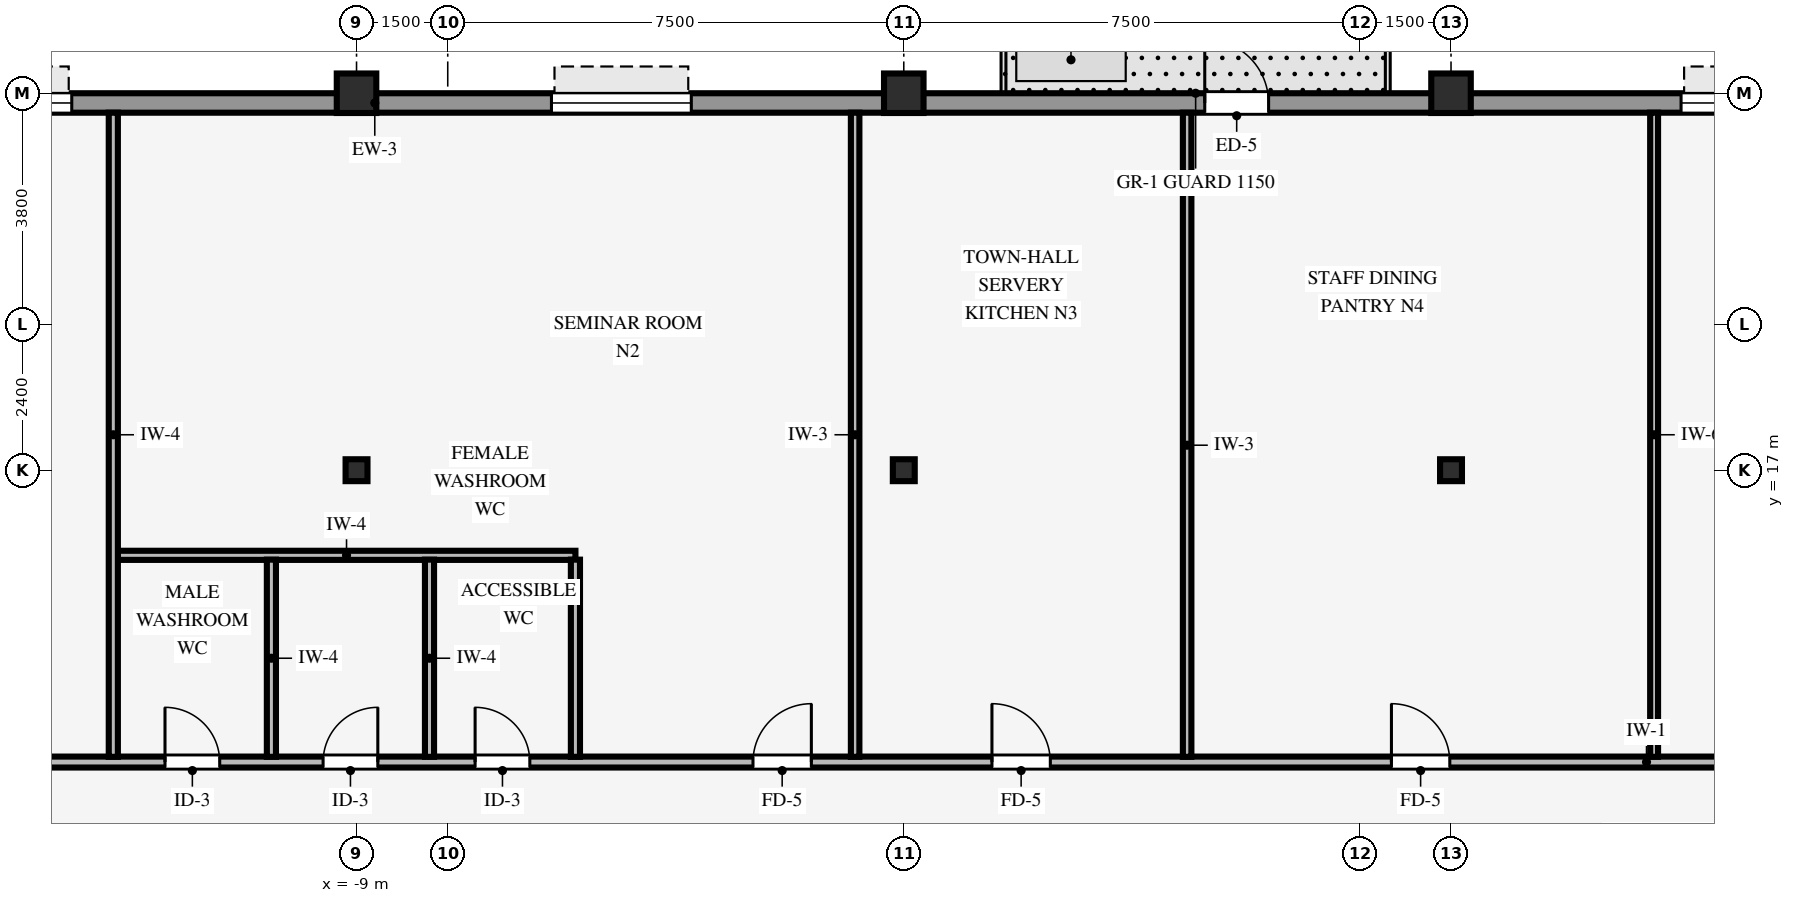
"""IFC4 building model, lengths in metres.
Left out: names, types, materials, properties, quantities, classifications, styles, units other than length and angle.
Written with IfcOpenShell. Run it as: python <this file> out.ifc"""

import sys

from ifc_helpers import new_model, si_unit, direction, frame, frame_2d, origin, origin_2d, place, context, subcontext, project, spatial, rectangle, hollow_rectangle, i_section, extrude, source, transform, mapped, element, fill, save


model = new_model("IFC4")
c1 = context("Model", 3, precision=1e-05, world=origin(), true_north=direction((0.0, 1.0)))
c2 = subcontext(c1, "Body", "Model", "MODEL_VIEW")
j1 = project(units=[si_unit("LENGTHUNIT", "METRE"), si_unit("PLANEANGLEUNIT", "RADIAN")], contexts=[c1])
p1 = place(None, origin())
s1 = spatial("IfcSite", under=j1, at=p1, CompositionType="ELEMENT")
p2 = place(p1, origin())
s2 = spatial("IfcBuilding", under=s1, at=p2, CompositionType="ELEMENT")
p3 = place(p2, frame((0.0, 0.0, 98.3)))
s3 = spatial("IfcBuildingStorey", under=s2, at=p3, CompositionType="ELEMENT", Elevation=98.3)
for number, where, z_axis, x_axis in (
    (1, (-9.0, 23.2, 0.0), (0.0, 0.0, 1.0), (1.0, 0.0, 0.0)),
    (2, (0.0, 23.2, 0.0), (0.0, 0.0, 1.0), (1.0, 0.0, 0.0)),
    (3, (9.0, 23.2, 0.0), (0.0, 0.0, 1.0), (1.0, 0.0, 0.0)),
):
    element("IfcColumn", number, at=place(p3, frame(where, z_axis=z_axis, x_axis=x_axis)), inside=s3, PredefinedType="COLUMN", context=c2, shape_type="SweptSolid", body=[
        extrude(hollow_rectangle(XDim=0.65, YDim=0.65, WallThickness=0.04, InnerFilletRadius=0.04, OuterFilletRadius=0.08, at=origin_2d()), origin(), (0.0, 0.0, 1.0), 3.37),
    ])
for number, where, z_axis, x_axis in (
    (4, (0.0, 17.0, 0.0), (0.0, 0.0, 1.0), (1.0, 0.0, 0.0)),
    (5, (-9.0, 17.0, 0.0), (0.0, 0.0, 1.0), (1.0, 0.0, 0.0)),
    (6, (9.0, 17.0, 0.0), (0.0, 0.0, 1.0), (1.0, 0.0, 0.0)),
):
    element("IfcColumn", number, at=place(p3, frame(where, z_axis=z_axis, x_axis=x_axis)), inside=s3, PredefinedType="COLUMN", context=c2, shape_type="SweptSolid", body=[
        extrude(i_section(OverallWidth=0.36, OverallDepth=0.36, WebThickness=0.021, FlangeThickness=0.021, FilletRadius=0.018, at=origin_2d()), origin(), (0.0, 0.0, 1.0), 3.37),
    ])
p4 = place(p3, frame((-21.9, 23.04, 0.0), z_axis=(0.0, 0.0, 1.0), x_axis=(1.0, 0.0, 0.0)))
e7 = element("IfcWall", 7, at=p4, inside=s3, PredefinedType="STANDARD", context=c2, shape_type="SweptSolid", body=[
    extrude(rectangle(XDim=43.8, YDim=0.32, at=frame_2d((21.9, 0.0))), origin(), (0.0, 0.0, 1.0), 2.705),
])
p5 = place(p4, frame((26.85, 0.0, 0.0)))
e8 = element("IfcOpeningElement", 8, at=p5, cuts=e7, PredefinedType="OPENING", context=c2, shape_type="SweptSolid", body=[
    extrude(rectangle(XDim=1.05, YDim=2.1, at=frame_2d((0.525, 1.05))), frame((0.0, 0.17, 0.0), z_axis=(0.0, -1.0, 0.0), x_axis=(1.0, 0.0, 0.0)), (0.0, 0.0, 1.0), 0.34),
])
p6 = place(p4, frame((2.172, 0.0, 0.8)))
e9 = element("IfcOpeningElement", 9, at=p6, cuts=e7, PredefinedType="OPENING", context=c2, shape_type="SweptSolid", body=[
    extrude(rectangle(XDim=2.3, YDim=1.62, at=frame_2d((1.15, 0.81))), frame((0.0, 0.17, 0.0), z_axis=(0.0, -1.0, 0.0), x_axis=(1.0, 0.0, 0.0)), (0.0, 0.0, 1.0), 0.34),
])
p7 = place(p4, frame((5.917, 0.0, 0.8)))
e10 = element("IfcOpeningElement", 10, at=p7, cuts=e7, PredefinedType="OPENING", context=c2, shape_type="SweptSolid", body=[
    extrude(rectangle(XDim=2.3, YDim=1.62, at=frame_2d((1.15, 0.81))), frame((0.0, 0.17, 0.0), z_axis=(0.0, -1.0, 0.0), x_axis=(1.0, 0.0, 0.0)), (0.0, 0.0, 1.0), 0.34),
])
p8 = place(p4, frame((16.106, 0.0, 0.8)))
e11 = element("IfcOpeningElement", 11, at=p8, cuts=e7, PredefinedType="OPENING", context=c2, shape_type="SweptSolid", body=[
    extrude(rectangle(XDim=2.3, YDim=1.62, at=frame_2d((1.15, 0.81))), frame((0.0, 0.17, 0.0), z_axis=(0.0, -1.0, 0.0), x_axis=(1.0, 0.0, 0.0)), (0.0, 0.0, 1.0), 0.34),
])
p9 = place(p4, frame((34.683, 0.0, 0.8)))
e12 = element("IfcOpeningElement", 12, at=p9, cuts=e7, PredefinedType="OPENING", context=c2, shape_type="SweptSolid", body=[
    extrude(rectangle(XDim=2.3, YDim=1.62, at=frame_2d((1.15, 0.81))), frame((0.0, 0.17, 0.0), z_axis=(0.0, -1.0, 0.0), x_axis=(1.0, 0.0, 0.0)), (0.0, 0.0, 1.0), 0.34),
])
p10 = place(p4, frame((39.328, 0.0, 0.8)))
e13 = element("IfcOpeningElement", 13, at=p10, cuts=e7, PredefinedType="OPENING", context=c2, shape_type="SweptSolid", body=[
    extrude(rectangle(XDim=2.3, YDim=1.62, at=frame_2d((1.15, 0.81))), frame((0.0, 0.17, 0.0), z_axis=(0.0, -1.0, 0.0), x_axis=(1.0, 0.0, 0.0)), (0.0, 0.0, 1.0), 0.34),
])
p11 = place(p3, frame((-15.0, 12.2, 0.0), z_axis=(0.0, 0.0, 1.0), x_axis=(1.0, 0.0, 0.0)))
e14 = element("IfcWall", 14, at=p11, inside=s3, PredefinedType="PARTITIONING", context=c2, shape_type="SweptSolid", body=[
    extrude(rectangle(XDim=30.0, YDim=0.18, at=frame_2d((15.0, 0.0))), origin(), (0.0, 0.0, 1.0), 3.36),
])
p12 = place(p11, frame((23.02, 0.0, 0.0)))
e15 = element("IfcOpeningElement", 15, at=p12, cuts=e14, PredefinedType="OPENING", context=c2, shape_type="SweptSolid", body=[
    extrude(rectangle(XDim=0.96, YDim=2.1, at=frame_2d((0.48, 1.05))), frame((0.0, 0.1, 0.0), z_axis=(0.0, -1.0, 0.0), x_axis=(1.0, 0.0, 0.0)), (0.0, 0.0, 1.0), 0.2),
])
p13 = place(p11, frame((16.45, 0.0, 0.0)))
e16 = element("IfcOpeningElement", 16, at=p13, cuts=e14, PredefinedType="OPENING", context=c2, shape_type="SweptSolid", body=[
    extrude(rectangle(XDim=0.96, YDim=2.1, at=frame_2d((0.48, 1.05))), frame((0.0, 0.1, 0.0), z_axis=(0.0, -1.0, 0.0), x_axis=(1.0, 0.0, 0.0)), (0.0, 0.0, 1.0), 0.2),
])
p14 = place(p11, frame((5.45, 0.0, 0.0)))
e17 = element("IfcOpeningElement", 17, at=p14, cuts=e14, PredefinedType="OPENING", context=c2, shape_type="SweptSolid", body=[
    extrude(rectangle(XDim=0.9, YDim=2.1, at=frame_2d((0.45, 1.05))), frame((0.0, 0.1, 0.0), z_axis=(0.0, -1.0, 0.0), x_axis=(1.0, 0.0, 0.0)), (0.0, 0.0, 1.0), 0.2),
])
p15 = place(p11, frame((2.85, 0.0, 0.0)))
e18 = element("IfcOpeningElement", 18, at=p15, cuts=e14, PredefinedType="OPENING", context=c2, shape_type="SweptSolid", body=[
    extrude(rectangle(XDim=0.9, YDim=2.1, at=frame_2d((0.45, 1.05))), frame((0.0, 0.1, 0.0), z_axis=(0.0, -1.0, 0.0), x_axis=(1.0, 0.0, 0.0)), (0.0, 0.0, 1.0), 0.2),
])
p16 = place(p11, frame((12.52, 0.0, 0.0)))
e19 = element("IfcOpeningElement", 19, at=p16, cuts=e14, PredefinedType="OPENING", context=c2, shape_type="SweptSolid", body=[
    extrude(rectangle(XDim=0.96, YDim=2.1, at=frame_2d((0.48, 1.05))), frame((0.0, 0.1, 0.0), z_axis=(0.0, -1.0, 0.0), x_axis=(1.0, 0.0, 0.0)), (0.0, 0.0, 1.0), 0.2),
])
p17 = place(p11, frame((7.95, 0.0, 0.0)))
e20 = element("IfcOpeningElement", 20, at=p17, cuts=e14, PredefinedType="OPENING", context=c2, shape_type="SweptSolid", body=[
    extrude(rectangle(XDim=0.9, YDim=2.1, at=frame_2d((0.45, 1.05))), frame((0.0, 0.1, 0.0), z_axis=(0.0, -1.0, 0.0), x_axis=(1.0, 0.0, 0.0)), (0.0, 0.0, 1.0), 0.2),
])
p18 = place(p3, frame((-12.929, 15.6, 0.0), z_axis=(0.0, 0.0, 1.0), x_axis=(1.0, 0.0, 0.0)))
e21 = element("IfcWall", 21, at=p18, inside=s3, PredefinedType="PARTITIONING", context=c2, shape_type="SweptSolid", body=[
    extrude(rectangle(XDim=7.529, YDim=0.15, at=frame_2d((3.765, 0.0))), origin(), (0.0, 0.0, 1.0), 3.36),
])
p19 = place(p3, frame((-13.0, 12.286, 0.0), z_axis=(0.0, 0.0, 1.0), x_axis=(0.0, 1.0, 0.0)))
e22 = element("IfcWall", 22, at=p19, inside=s3, PredefinedType="PARTITIONING", context=c2, shape_type="SweptSolid", body=[
    extrude(rectangle(XDim=10.594, YDim=0.15, at=frame_2d((5.297, 0.0))), origin(), (0.0, 0.0, 1.0), 3.36),
])
for number, where, z_axis, x_axis in (
    (23, (-10.4, 12.286, 0.0), (0.0, 0.0, 1.0), (0.0, 1.0, 0.0)),
    (24, (-7.8, 12.286, 0.0), (0.0, 0.0, 1.0), (0.0, 1.0, 0.0)),
    (25, (-5.4, 12.286, 0.0), (0.0, 0.0, 1.0), (0.0, 1.0, 0.0)),
):
    element("IfcWall", number, at=place(p3, frame(where, z_axis=z_axis, x_axis=x_axis)), inside=s3, PredefinedType="PARTITIONING", context=c2, shape_type="SweptSolid", body=[
        extrude(rectangle(XDim=3.243, YDim=0.15, at=frame_2d((1.622, 0.0))), origin(), (0.0, 0.0, 1.0), 3.36),
    ])
for number, where, z_axis, x_axis in (
    (26, (-0.8, 12.286, 0.0), (0.0, 0.0, 1.0), (0.0, 1.0, 0.0)),
    (27, (4.66, 12.286, 0.0), (0.0, 0.0, 1.0), (0.0, 1.0, 0.0)),
):
    element("IfcWall", number, at=place(p3, frame(where, z_axis=z_axis, x_axis=x_axis)), inside=s3, PredefinedType="PARTITIONING", context=c2, shape_type="SweptSolid", body=[
        extrude(rectangle(XDim=10.594, YDim=0.14, at=frame_2d((5.297, 0.0))), origin(), (0.0, 0.0, 1.0), 3.36),
    ])
p20 = place(p3, frame((12.34, 12.286, 0.0), z_axis=(0.0, 0.0, 1.0), x_axis=(0.0, 1.0, 0.0)))
e28 = element("IfcWall", 28, at=p20, inside=s3, PredefinedType="PARTITIONING", context=c2, shape_type="SweptSolid", body=[
    extrude(rectangle(XDim=10.594, YDim=0.13, at=frame_2d((5.297, 0.0))), origin(), (0.0, 0.0, 1.0), 3.36),
])
m1 = source(origin(), c2, "Body", "SweptSolid", [
    extrude(rectangle(XDim=1.05, YDim=2.1, at=frame_2d((0.525, 1.05))), frame((0.0, 0.025, 0.0), z_axis=(0.0, -1.0, 0.0), x_axis=(1.0, 0.0, 0.0)), (0.0, 0.0, 1.0), 0.05),
])
p21 = place(p5, origin())
e29 = element("IfcDoor", 29, at=p21, inside=s3, OperationType="SINGLE_SWING_LEFT", PredefinedType="DOOR", context=c2, shape_type="MappedRepresentation", body=[
    mapped(m1, transform((0.0, 0.0, 0.0), scale=1.0)),
])
fill(e8, e29)
m2 = source(origin(), c2, "Body", "SweptSolid", [
    extrude(rectangle(XDim=2.3, YDim=1.62, at=frame_2d((1.15, 0.81))), frame((0.0, 0.03, 0.0), z_axis=(0.0, -1.0, 0.0), x_axis=(1.0, 0.0, 0.0)), (0.0, 0.0, 1.0), 0.06),
])
p22 = place(p7, origin())
e30 = element("IfcWindow", 30, at=p22, inside=s3, PartitioningType="SINGLE_PANEL", PredefinedType="WINDOW", context=c2, shape_type="MappedRepresentation", body=[
    mapped(m2, transform((0.0, 0.0, 0.0), scale=1.0)),
])
fill(e10, e30)
p23 = place(p8, origin())
e31 = element("IfcWindow", 31, at=p23, inside=s3, PartitioningType="SINGLE_PANEL", PredefinedType="WINDOW", context=c2, shape_type="MappedRepresentation", body=[
    mapped(m2, transform((0.0, 0.0, 0.0), scale=1.0)),
])
fill(e11, e31)
p24 = place(p9, origin())
e32 = element("IfcWindow", 32, at=p24, inside=s3, PartitioningType="SINGLE_PANEL", PredefinedType="WINDOW", context=c2, shape_type="MappedRepresentation", body=[
    mapped(m2, transform((0.0, 0.0, 0.0), scale=1.0)),
])
fill(e12, e32)
m3 = source(origin(), c2, "Body", "SweptSolid", [
    extrude(rectangle(XDim=0.96, YDim=2.1, at=frame_2d((0.48, 1.05))), frame((0.0, 0.025, 0.0), z_axis=(0.0, -1.0, 0.0), x_axis=(1.0, 0.0, 0.0)), (0.0, 0.0, 1.0), 0.05),
])
p25 = place(p12, origin())
e33 = element("IfcDoor", 33, at=p25, inside=s3, OperationType="SINGLE_SWING_LEFT", PredefinedType="DOOR", context=c2, shape_type="MappedRepresentation", body=[
    mapped(m3, transform((0.0, 0.0, 0.0), scale=1.0)),
])
fill(e15, e33)
p26 = place(p13, origin())
e34 = element("IfcDoor", 34, at=p26, inside=s3, OperationType="SINGLE_SWING_LEFT", PredefinedType="DOOR", context=c2, shape_type="MappedRepresentation", body=[
    mapped(m3, transform((0.0, 0.0, 0.0), scale=1.0)),
])
fill(e16, e34)
m4 = source(origin(), c2, "Body", "SweptSolid", [
    extrude(rectangle(XDim=0.9, YDim=2.1, at=frame_2d((0.45, 1.05))), frame((0.0, 0.025, 0.0), z_axis=(0.0, -1.0, 0.0), x_axis=(1.0, 0.0, 0.0)), (0.0, 0.0, 1.0), 0.05),
])
p27 = place(p14, origin())
e35 = element("IfcDoor", 35, at=p27, inside=s3, OperationType="SINGLE_SWING_RIGHT", PredefinedType="DOOR", context=c2, shape_type="MappedRepresentation", body=[
    mapped(m4, transform((0.0, 0.0, 0.0), scale=1.0)),
])
fill(e17, e35)
p28 = place(p15, origin())
e36 = element("IfcDoor", 36, at=p28, inside=s3, OperationType="SINGLE_SWING_LEFT", PredefinedType="DOOR", context=c2, shape_type="MappedRepresentation", body=[
    mapped(m4, transform((0.0, 0.0, 0.0), scale=1.0)),
])
fill(e18, e36)
p29 = place(p16, origin())
e37 = element("IfcDoor", 37, at=p29, inside=s3, OperationType="SINGLE_SWING_RIGHT", PredefinedType="DOOR", context=c2, shape_type="MappedRepresentation", body=[
    mapped(m3, transform((0.0, 0.0, 0.0), scale=1.0)),
])
fill(e19, e37)
p30 = place(p17, origin())
e38 = element("IfcDoor", 38, at=p30, inside=s3, OperationType="SINGLE_SWING_LEFT", PredefinedType="DOOR", context=c2, shape_type="MappedRepresentation", body=[
    mapped(m4, transform((0.0, 0.0, 0.0), scale=1.0)),
])
fill(e20, e38)
save(model, sys.argv[1])
